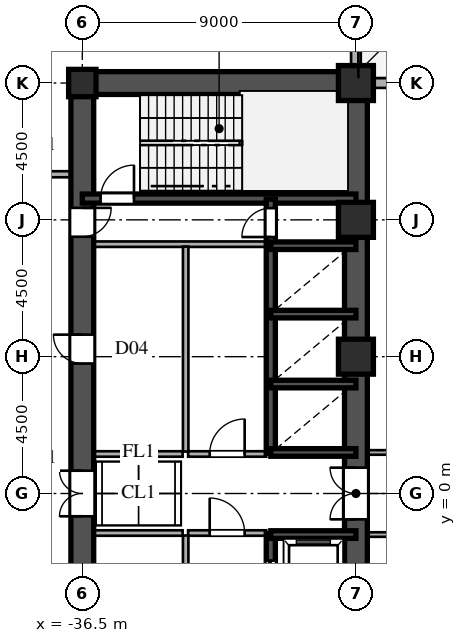
"""IFC4 building model, lengths in metres.
Left out: names, types, materials, properties, quantities, classifications, styles, units other than length and angle.
Written with IfcOpenShell. Run it as: python <this file> out.ifc"""

import sys

from ifc_helpers import new_model, si_unit, direction, frame, frame_2d, origin, origin_2d, place, context, subcontext, project, spatial, rectangle, hollow_rectangle, i_section, extrude, source, transform, mapped, element, fill, save


model = new_model("IFC4")
c1 = context("Model", 3, precision=1e-05, world=origin(), true_north=direction((0.0, 1.0)))
c2 = subcontext(c1, "Body", "Model", "MODEL_VIEW")
j1 = project(units=[si_unit("LENGTHUNIT", "METRE"), si_unit("PLANEANGLEUNIT", "RADIAN")], contexts=[c1])
p1 = place(None, origin())
s1 = spatial("IfcSite", under=j1, at=p1, CompositionType="ELEMENT")
p2 = place(p1, origin())
s2 = spatial("IfcBuilding", under=s1, at=p2, CompositionType="ELEMENT")
p3 = place(p2, frame((0.0, 0.0, 14.4)))
s3 = spatial("IfcBuildingStorey", under=s2, at=p3, CompositionType="ELEMENT", Elevation=14.4)
m1 = source(origin(), c2, "Body", "SweptSolid", [
    extrude(hollow_rectangle(XDim=1.15, YDim=1.15, WallThickness=0.048, at=origin_2d()), origin(), (0.0, 0.0, 1.0), 4.5),
])
for number, where, z_axis, x_axis in (
    (1, (-27.5, 4.5, 0.0), (0.0, 0.0, 1.0), (1.0, 0.0, 0.0)),
    (2, (-27.5, 9.0, 0.0), (0.0, 0.0, 1.0), (1.0, 0.0, 0.0)),
    (3, (-27.5, 13.5, 0.0), (0.0, 0.0, 1.0), (1.0, 0.0, 0.0)),
):
    element("IfcColumn", number, at=place(p3, frame(where, z_axis=z_axis, x_axis=x_axis)), inside=s3, PredefinedType="COLUMN", context=c2, shape_type="MappedRepresentation", body=[
        mapped(m1, transform((0.0, 0.0, 0.0), scale=1.0)),
    ])
m2 = source(origin(), c2, "Body", "SweptSolid", [
    extrude(i_section(OverallWidth=0.9, OverallDepth=0.9, WebThickness=0.036, FlangeThickness=0.055, at=origin_2d()), origin(), (0.0, 0.0, 1.0), 4.5),
])
p4 = place(p3, frame((-36.5, 13.5, 0.0), z_axis=(0.0, 0.0, 1.0), x_axis=(1.0, 0.0, 0.0)))
e4 = element("IfcColumn", 4, at=p4, inside=s3, PredefinedType="COLUMN", context=c2, shape_type="MappedRepresentation", body=[
    mapped(m2, transform((0.0, 0.0, 0.0), scale=1.0)),
])
p5 = place(p3, frame((27.46, 13.5, 0.0), z_axis=(0.0, 0.0, 1.0), x_axis=(-1.0, 0.0, 0.0)))
e5 = element("IfcWall", 5, at=p5, inside=s3, PredefinedType="SOLIDWALL", context=c2, shape_type="SweptSolid", body=[
    extrude(rectangle(XDim=54.92, YDim=0.32, at=frame_2d((27.46, 0.0))), origin(), (0.0, 0.0, 1.0), 4.28),
])
p6 = place(p5, frame((34.4, 0.0, 0.0)))
e6 = element("IfcOpeningElement", 6, at=p6, cuts=e5, PredefinedType="OPENING", context=c2, shape_type="SweptSolid", body=[
    extrude(rectangle(XDim=1.8, YDim=2.3, at=frame_2d((0.9, 1.15))), frame((0.0, 0.17, 0.0), z_axis=(0.0, -1.0, 0.0), x_axis=(1.0, 0.0, 0.0)), (0.0, 0.0, 1.0), 0.34),
])
p7 = place(p5, frame((37.4, 0.0, 0.0)))
e7 = element("IfcOpeningElement", 7, at=p7, cuts=e5, PredefinedType="OPENING", context=c2, shape_type="SweptSolid", body=[
    extrude(rectangle(XDim=1.8, YDim=2.3, at=frame_2d((0.9, 1.15))), frame((0.0, 0.17, 0.0), z_axis=(0.0, -1.0, 0.0), x_axis=(1.0, 0.0, 0.0)), (0.0, 0.0, 1.0), 0.34),
])
p8 = place(p5, frame((4.5, 0.0, 0.8)))
e8 = element("IfcOpeningElement", 8, at=p8, cuts=e5, PredefinedType="OPENING", context=c2, shape_type="SweptSolid", body=[
    extrude(rectangle(XDim=1.65, YDim=1.85, at=frame_2d((0.825, 0.925))), frame((0.0, 0.17, 0.0), z_axis=(0.0, -1.0, 0.0), x_axis=(1.0, 0.0, 0.0)), (0.0, 0.0, 1.0), 0.34),
])
p9 = place(p5, frame((25.0, 0.0, 0.8)))
e9 = element("IfcOpeningElement", 9, at=p9, cuts=e5, PredefinedType="OPENING", context=c2, shape_type="SweptSolid", body=[
    extrude(rectangle(XDim=1.65, YDim=1.85, at=frame_2d((0.825, 0.925))), frame((0.0, 0.17, 0.0), z_axis=(0.0, -1.0, 0.0), x_axis=(1.0, 0.0, 0.0)), (0.0, 0.0, 1.0), 0.34),
])
p10 = place(p5, frame((46.42, 0.0, 0.8)))
e10 = element("IfcOpeningElement", 10, at=p10, cuts=e5, PredefinedType="OPENING", context=c2, shape_type="SweptSolid", body=[
    extrude(rectangle(XDim=1.65, YDim=1.85, at=frame_2d((0.825, 0.925))), frame((0.0, 0.17, 0.0), z_axis=(0.0, -1.0, 0.0), x_axis=(1.0, 0.0, 0.0)), (0.0, 0.0, 1.0), 0.34),
])
p11 = place(p3, frame((-27.5, 13.55, 0.0), z_axis=(0.0, 0.0, 1.0), x_axis=(0.0, 1.0, 0.0)))
e11 = element("IfcWall", 11, at=p11, inside=s3, PredefinedType="SOLIDWALL", context=c2, shape_type="SweptSolid", body=[
    extrude(rectangle(XDim=10.4, YDim=0.32, at=frame_2d((5.2, 0.0))), origin(), (0.0, 0.0, 1.0), 2.78),
])
p12 = place(p3, frame((-30.537, 26.985, 0.0), z_axis=(0.0, 0.0, 1.0), x_axis=(-0.926944846568, -0.375197616492, 0.0)))
e12 = element("IfcWall", 12, at=p12, inside=s3, PredefinedType="SOLIDWALL", context=c2, shape_type="SweptSolid", body=[
    extrude(rectangle(XDim=45.23, YDim=0.32, at=frame_2d((22.615, 0.0))), origin(), (0.0, 0.0, 1.0), 4.28),
])
p13 = place(p12, frame((6.0, 0.0, 0.85)))
e13 = element("IfcOpeningElement", 13, at=p13, cuts=e12, PredefinedType="OPENING", context=c2, shape_type="SweptSolid", body=[
    extrude(rectangle(XDim=1.8, YDim=2.0, at=frame_2d((0.9, 1.0))), frame((0.0, 0.17, 0.0), z_axis=(0.0, -1.0, 0.0), x_axis=(1.0, 0.0, 0.0)), (0.0, 0.0, 1.0), 0.34),
])
p14 = place(p12, frame((36.23, 0.0, 0.85)))
e14 = element("IfcOpeningElement", 14, at=p14, cuts=e12, PredefinedType="OPENING", context=c2, shape_type="SweptSolid", body=[
    extrude(rectangle(XDim=1.8, YDim=2.0, at=frame_2d((0.9, 1.0))), frame((0.0, 0.17, 0.0), z_axis=(0.0, -1.0, 0.0), x_axis=(1.0, 0.0, 0.0)), (0.0, 0.0, 1.0), 0.34),
])
for number, where, z_axis, x_axis in (
    (15, (-27.5, -13.5, 0.0), (0.0, 0.0, 1.0), (0.0, 1.0, 0.0)),
    (16, (-27.5, 1.3, 0.0), (0.0, 0.0, 1.0), (0.0, 1.0, 0.0)),
):
    element("IfcWall", number, at=place(p3, frame(where, z_axis=z_axis, x_axis=x_axis)), inside=s3, PredefinedType="SHEAR", context=c2, shape_type="SweptSolid", body=[
        extrude(rectangle(XDim=12.2, YDim=0.75, at=frame_2d((6.1, 0.0))), origin(), (0.0, 0.0, 1.0), 4.28),
    ])
p15 = place(p3, frame((-27.5, -1.3, 0.0), z_axis=(0.0, 0.0, 1.0), x_axis=(0.0, 1.0, 0.0)))
e17 = element("IfcWall", 17, at=p15, inside=s3, PredefinedType="SHEAR", context=c2, shape_type="SweptSolid", body=[
    extrude(rectangle(XDim=2.6, YDim=0.75, at=frame_2d((1.3, 0.0))), origin(), (0.0, 0.0, 1.0), 4.28),
])
p16 = place(p15, frame((0.45, 0.0, 0.0)))
e18 = element("IfcOpeningElement", 18, at=p16, cuts=e17, PredefinedType="OPENING", context=c2, shape_type="SweptSolid", body=[
    extrude(rectangle(XDim=1.7, YDim=2.35, at=frame_2d((0.85, 1.175))), frame((0.0, 0.385, 0.0), z_axis=(0.0, -1.0, 0.0), x_axis=(1.0, 0.0, 0.0)), (0.0, 0.0, 1.0), 0.77),
])
p17 = place(p3, frame((-36.5, 13.5, 0.0), z_axis=(0.0, 0.0, 1.0), x_axis=(1.0, 0.0, 0.0)))
e19 = element("IfcWall", 19, at=p17, inside=s3, PredefinedType="SHEAR", context=c2, shape_type="SweptSolid", body=[
    extrude(rectangle(XDim=9.0, YDim=0.75, at=frame_2d((4.5, 0.0))), origin(), (0.0, 0.0, 1.0), 4.28),
])
p18 = place(p3, frame((-36.5, -1.3, 0.0), z_axis=(0.0, 0.0, 1.0), x_axis=(0.0, 1.0, 0.0)))
e20 = element("IfcWall", 20, at=p18, inside=s3, PredefinedType="SHEAR", context=c2, shape_type="SweptSolid", body=[
    extrude(rectangle(XDim=2.6, YDim=0.75, at=frame_2d((1.3, 0.0))), origin(), (0.0, 0.0, 1.0), 4.28),
])
p19 = place(p18, frame((0.55, 0.0, 0.0)))
e21 = element("IfcOpeningElement", 21, at=p19, cuts=e20, PredefinedType="OPENING", context=c2, shape_type="SweptSolid", body=[
    extrude(rectangle(XDim=1.5, YDim=2.3, at=frame_2d((0.75, 1.15))), frame((0.0, 0.385, 0.0), z_axis=(0.0, -1.0, 0.0), x_axis=(1.0, 0.0, 0.0)), (0.0, 0.0, 1.0), 0.77),
])
p20 = place(p3, frame((-36.5, 8.2, 0.0), z_axis=(0.0, 0.0, 1.0), x_axis=(0.0, 1.0, 0.0)))
e22 = element("IfcWall", 22, at=p20, inside=s3, PredefinedType="SHEAR", context=c2, shape_type="SweptSolid", body=[
    extrude(rectangle(XDim=5.45, YDim=0.75, at=frame_2d((2.725, 0.0))), origin(), (0.0, 0.0, 1.0), 4.28),
])
p21 = place(p20, frame((0.245, 0.0, 0.0)))
e23 = element("IfcOpeningElement", 23, at=p21, cuts=e22, PredefinedType="OPENING", context=c2, shape_type="SweptSolid", body=[
    extrude(rectangle(XDim=0.95, YDim=2.15, at=frame_2d((0.475, 1.075))), frame((0.0, 0.385, 0.0), z_axis=(0.0, -1.0, 0.0), x_axis=(1.0, 0.0, 0.0)), (0.0, 0.0, 1.0), 0.77),
])
p22 = place(p3, frame((-36.5, -6.5, 0.0), z_axis=(0.0, 0.0, 1.0), x_axis=(0.0, 1.0, 0.0)))
e24 = element("IfcWall", 24, at=p22, inside=s3, PredefinedType="SHEAR", context=c2, shape_type="SweptSolid", body=[
    extrude(rectangle(XDim=5.2, YDim=0.75, at=frame_2d((2.6, 0.0))), origin(), (0.0, 0.0, 1.0), 4.28),
])
p23 = place(p22, frame((2.125, 0.0, 0.0)))
e25 = element("IfcOpeningElement", 25, at=p23, cuts=e24, PredefinedType="OPENING", context=c2, shape_type="SweptSolid", body=[
    extrude(rectangle(XDim=0.95, YDim=2.15, at=frame_2d((0.475, 1.075))), frame((0.0, 0.385, 0.0), z_axis=(0.0, -1.0, 0.0), x_axis=(1.0, 0.0, 0.0)), (0.0, 0.0, 1.0), 0.77),
])
p24 = place(p3, frame((-36.5, 1.3, 0.0), z_axis=(0.0, 0.0, 1.0), x_axis=(0.0, 1.0, 0.0)))
e26 = element("IfcWall", 26, at=p24, inside=s3, PredefinedType="SHEAR", context=c2, shape_type="SweptSolid", body=[
    extrude(rectangle(XDim=6.9, YDim=0.75, at=frame_2d((3.45, 0.0))), origin(), (0.0, 0.0, 1.0), 4.28),
])
p25 = place(p24, frame((2.975, 0.0, 0.0)))
e27 = element("IfcOpeningElement", 27, at=p25, cuts=e26, PredefinedType="OPENING", context=c2, shape_type="SweptSolid", body=[
    extrude(rectangle(XDim=0.95, YDim=2.15, at=frame_2d((0.475, 1.075))), frame((0.0, 0.385, 0.0), z_axis=(0.0, -1.0, 0.0), x_axis=(1.0, 0.0, 0.0)), (0.0, 0.0, 1.0), 0.77),
])
p26 = place(p3, frame((-36.5, 9.7, 0.0), z_axis=(0.0, 0.0, 1.0), x_axis=(1.0, 0.0, 0.0)))
e28 = element("IfcWall", 28, at=p26, inside=s3, PredefinedType="SHEAR", context=c2, shape_type="SweptSolid", body=[
    extrude(rectangle(XDim=9.0, YDim=0.3, at=frame_2d((4.5, 0.0))), origin(), (0.0, 0.0, 1.0), 4.28),
])
p27 = place(p26, frame((0.6, 0.0, 0.0)))
e29 = element("IfcOpeningElement", 29, at=p27, cuts=e28, PredefinedType="OPENING", context=c2, shape_type="SweptSolid", body=[
    extrude(rectangle(XDim=1.1, YDim=2.2, at=frame_2d((0.55, 1.1))), frame((0.0, 0.16, 0.0), z_axis=(0.0, -1.0, 0.0), x_axis=(1.0, 0.0, 0.0)), (0.0, 0.0, 1.0), 0.32),
])
for number, where, z_axis, x_axis in (
    (30, (-30.3, -1.35, 0.0), (0.0, 0.0, 1.0), (1.0, 0.0, 0.0)),
    (31, (-30.3, 1.35, 0.0), (0.0, 0.0, 1.0), (1.0, 0.0, 0.0)),
    (32, (-30.3, 3.6, 0.0), (0.0, 0.0, 1.0), (1.0, 0.0, 0.0)),
    (33, (-30.3, 5.9, 0.0), (0.0, 0.0, 1.0), (1.0, 0.0, 0.0)),
    (34, (-30.3, 8.15, 0.0), (0.0, 0.0, 1.0), (1.0, 0.0, 0.0)),
):
    element("IfcWall", number, at=place(p3, frame(where, z_axis=z_axis, x_axis=x_axis)), inside=s3, PredefinedType="SHEAR", context=c2, shape_type="SweptSolid", body=[
        extrude(rectangle(XDim=2.8, YDim=0.25, at=frame_2d((1.4, 0.0))), origin(), (0.0, 0.0, 1.0), 4.28),
    ])
p28 = place(p3, frame((-30.3, -4.2, 0.0), z_axis=(0.0, 0.0, 1.0), x_axis=(0.0, 1.0, 0.0)))
e35 = element("IfcWall", 35, at=p28, inside=s3, PredefinedType="SHEAR", context=c2, shape_type="SweptSolid", body=[
    extrude(rectangle(XDim=2.88, YDim=0.3, at=frame_2d((1.44, 0.0))), origin(), (0.0, 0.0, 1.0), 4.28),
])
p29 = place(p28, frame((0.89, 0.0, 0.0)))
e36 = element("IfcOpeningElement", 36, at=p29, cuts=e35, PredefinedType="OPENING", context=c2, shape_type="SweptSolid", body=[
    extrude(rectangle(XDim=1.1, YDim=2.2, at=frame_2d((0.55, 1.1))), frame((0.0, 0.16, 0.0), z_axis=(0.0, -1.0, 0.0), x_axis=(1.0, 0.0, 0.0)), (0.0, 0.0, 1.0), 0.32),
])
p30 = place(p3, frame((-30.3, 1.32, 0.0), z_axis=(0.0, 0.0, 1.0), x_axis=(0.0, 1.0, 0.0)))
e37 = element("IfcWall", 37, at=p30, inside=s3, PredefinedType="SHEAR", context=c2, shape_type="SweptSolid", body=[
    extrude(rectangle(XDim=2.28, YDim=0.3, at=frame_2d((1.14, 0.0))), origin(), (0.0, 0.0, 1.0), 4.28),
])
p31 = place(p3, frame((-30.3, 3.6, 0.0), z_axis=(0.0, 0.0, 1.0), x_axis=(0.0, 1.0, 0.0)))
e38 = element("IfcWall", 38, at=p31, inside=s3, PredefinedType="SHEAR", context=c2, shape_type="SweptSolid", body=[
    extrude(rectangle(XDim=2.3, YDim=0.3, at=frame_2d((1.15, 0.0))), origin(), (0.0, 0.0, 1.0), 4.28),
])
p32 = place(p3, frame((-30.3, 5.9, 0.0), z_axis=(0.0, 0.0, 1.0), x_axis=(0.0, 1.0, 0.0)))
e39 = element("IfcWall", 39, at=p32, inside=s3, PredefinedType="SHEAR", context=c2, shape_type="SweptSolid", body=[
    extrude(rectangle(XDim=2.25, YDim=0.3, at=frame_2d((1.125, 0.0))), origin(), (0.0, 0.0, 1.0), 4.28),
])
p33 = place(p3, frame((-30.3, 8.15, 0.0), z_axis=(0.0, 0.0, 1.0), x_axis=(0.0, 1.0, 0.0)))
e40 = element("IfcWall", 40, at=p33, inside=s3, PredefinedType="SHEAR", context=c2, shape_type="SweptSolid", body=[
    extrude(rectangle(XDim=1.53, YDim=0.3, at=frame_2d((0.765, 0.0))), origin(), (0.0, 0.0, 1.0), 4.28),
])
p34 = place(p33, frame((0.285, 0.0, 0.0)))
e41 = element("IfcOpeningElement", 41, at=p34, cuts=e40, PredefinedType="OPENING", context=c2, shape_type="SweptSolid", body=[
    extrude(rectangle(XDim=0.95, YDim=2.15, at=frame_2d((0.475, 1.075))), frame((0.0, 0.16, 0.0), z_axis=(0.0, -1.0, 0.0), x_axis=(1.0, 0.0, 0.0)), (0.0, 0.0, 1.0), 0.32),
])
p35 = place(p3, frame((-36.15, 8.2, 0.0), z_axis=(0.0, 0.0, 1.0), x_axis=(1.0, 0.0, 0.0)))
e42 = element("IfcWall", 42, at=p35, inside=s3, PredefinedType="PARTITIONING", context=c2, shape_type="SweptSolid", body=[
    extrude(rectangle(XDim=5.7, YDim=0.18, at=frame_2d((2.85, 0.0))), origin(), (0.0, 0.0, 1.0), 4.28),
])
p36 = place(p3, frame((-33.1, -6.42, 0.0), z_axis=(0.0, 0.0, 1.0), x_axis=(0.0, 1.0, 0.0)))
e43 = element("IfcWall", 43, at=p36, inside=s3, PredefinedType="PARTITIONING", context=c2, shape_type="SweptSolid", body=[
    extrude(rectangle(XDim=5.04, YDim=0.18, at=frame_2d((2.52, 0.0))), origin(), (0.0, 0.0, 1.0), 4.28),
])
p37 = place(p3, frame((-33.1, 1.38, 0.0), z_axis=(0.0, 0.0, 1.0), x_axis=(0.0, 1.0, 0.0)))
e44 = element("IfcWall", 44, at=p37, inside=s3, PredefinedType="PARTITIONING", context=c2, shape_type="SweptSolid", body=[
    extrude(rectangle(XDim=6.74, YDim=0.18, at=frame_2d((3.37, 0.0))), origin(), (0.0, 0.0, 1.0), 4.28),
])
p38 = place(p3, frame((-33.02, -1.3, 0.0), z_axis=(0.0, 0.0, 1.0), x_axis=(1.0, 0.0, 0.0)))
e45 = element("IfcWall", 45, at=p38, inside=s3, PredefinedType="PARTITIONING", context=c2, shape_type="SweptSolid", body=[
    extrude(rectangle(XDim=2.57, YDim=0.18, at=frame_2d((1.285, 0.0))), origin(), (0.0, 0.0, 1.0), 4.28),
])
p39 = place(p38, frame((0.71, 0.0, 0.0)))
e46 = element("IfcOpeningElement", 46, at=p39, cuts=e45, PredefinedType="OPENING", context=c2, shape_type="SweptSolid", body=[
    extrude(rectangle(XDim=1.15, YDim=2.2, at=frame_2d((0.575, 1.1))), frame((0.0, 0.1, 0.0), z_axis=(0.0, -1.0, 0.0), x_axis=(1.0, 0.0, 0.0)), (0.0, 0.0, 1.0), 0.2),
])
p40 = place(p3, frame((-33.02, 1.3, 0.0), z_axis=(0.0, 0.0, 1.0), x_axis=(1.0, 0.0, 0.0)))
e47 = element("IfcWall", 47, at=p40, inside=s3, PredefinedType="PARTITIONING", context=c2, shape_type="SweptSolid", body=[
    extrude(rectangle(XDim=2.57, YDim=0.18, at=frame_2d((1.285, 0.0))), origin(), (0.0, 0.0, 1.0), 4.28),
])
p41 = place(p40, frame((0.71, 0.0, 0.0)))
e48 = element("IfcOpeningElement", 48, at=p41, cuts=e47, PredefinedType="OPENING", context=c2, shape_type="SweptSolid", body=[
    extrude(rectangle(XDim=1.15, YDim=2.2, at=frame_2d((0.575, 1.1))), frame((0.0, 0.1, 0.0), z_axis=(0.0, -1.0, 0.0), x_axis=(1.0, 0.0, 0.0)), (0.0, 0.0, 1.0), 0.2),
])
for number, where, z_axis, x_axis in (
    (49, (-36.15, -1.3, 0.0), (0.0, 0.0, 1.0), (1.0, 0.0, 0.0)),
    (50, (-36.15, 1.3, 0.0), (0.0, 0.0, 1.0), (1.0, 0.0, 0.0)),
):
    element("IfcWall", number, at=place(p3, frame(where, z_axis=z_axis, x_axis=x_axis)), inside=s3, PredefinedType="PARTITIONING", context=c2, shape_type="SweptSolid", body=[
        extrude(rectangle(XDim=2.95, YDim=0.18, at=frame_2d((1.475, 0.0))), origin(), (0.0, 0.0, 1.0), 4.28),
    ])
for number, where, z_axis, x_axis in (
    (51, (-27.12, -1.35, 0.0), (0.0, 0.0, 1.0), (1.0, 0.0, 0.0)),
    (52, (-27.12, 1.35, 0.0), (0.0, 0.0, 1.0), (1.0, 0.0, 0.0)),
):
    element("IfcWall", number, at=place(p3, frame(where, z_axis=z_axis, x_axis=x_axis)), inside=s3, PredefinedType="PARTITIONING", context=c2, shape_type="SweptSolid", body=[
        extrude(rectangle(XDim=14.835, YDim=0.15, at=frame_2d((7.417, 0.0))), origin(), (0.0, 0.0, 1.0), 4.28),
    ])
p42 = place(p3, frame((-38.915, 10.5, 0.0), z_axis=(0.0, 0.0, 1.0), x_axis=(1.0, 0.0, 0.0)))
e53 = element("IfcWall", 53, at=p42, inside=s3, PredefinedType="PARTITIONING", context=c2, shape_type="SweptSolid", body=[
    extrude(rectangle(XDim=2.035, YDim=0.2, at=frame_2d((1.018, 0.0))), origin(), (0.0, 0.0, 1.0), 4.28),
])
m3 = source(origin(), c2, "Body", "SweptSolid", [
    extrude(rectangle(XDim=1.7, YDim=2.35, at=frame_2d((0.85, 1.175))), frame((0.0, 0.025, 0.0), z_axis=(0.0, -1.0, 0.0), x_axis=(1.0, 0.0, 0.0)), (0.0, 0.0, 1.0), 0.05),
])
p43 = place(p16, origin())
e54 = element("IfcDoor", 54, at=p43, inside=s3, OperationType="DOUBLE_SWING_LEFT", PredefinedType="DOOR", context=c2, shape_type="MappedRepresentation", body=[
    mapped(m3, transform((0.0, 0.0, 0.0), scale=1.0)),
])
fill(e18, e54)
m4 = source(origin(), c2, "Body", "SweptSolid", [
    extrude(rectangle(XDim=1.5, YDim=2.3, at=frame_2d((0.75, 1.15))), frame((0.0, 0.025, 0.0), z_axis=(0.0, -1.0, 0.0), x_axis=(1.0, 0.0, 0.0)), (0.0, 0.0, 1.0), 0.05),
])
p44 = place(p19, origin())
e55 = element("IfcDoor", 55, at=p44, inside=s3, OperationType="DOUBLE_SWING_LEFT", PredefinedType="DOOR", context=c2, shape_type="MappedRepresentation", body=[
    mapped(m4, transform((0.0, 0.0, 0.0), scale=1.0)),
])
fill(e21, e55)
m5 = source(origin(), c2, "Body", "SweptSolid", [
    extrude(rectangle(XDim=0.95, YDim=2.15, at=frame_2d((0.475, 1.075))), frame((0.0, 0.025, 0.0), z_axis=(0.0, -1.0, 0.0), x_axis=(1.0, 0.0, 0.0)), (0.0, 0.0, 1.0), 0.05),
])
p45 = place(p21, frame((0.95, 0.0, 0.0), z_axis=(0.0, 0.0, 1.0), x_axis=(-1.0, 0.0, 0.0)))
e56 = element("IfcDoor", 56, at=p45, inside=s3, OperationType="SINGLE_SWING_RIGHT", PredefinedType="DOOR", context=c2, shape_type="MappedRepresentation", body=[
    mapped(m5, transform((0.0, 0.0, 0.0), scale=1.0)),
])
fill(e23, e56)
p46 = place(p25, origin())
e57 = element("IfcDoor", 57, at=p46, inside=s3, OperationType="SINGLE_SWING_RIGHT", PredefinedType="DOOR", context=c2, shape_type="MappedRepresentation", body=[
    mapped(m5, transform((0.0, 0.0, 0.0), scale=1.0)),
])
fill(e27, e57)
m6 = source(origin(), c2, "Body", "SweptSolid", [
    extrude(rectangle(XDim=1.1, YDim=2.2, at=frame_2d((0.55, 1.1))), frame((0.0, 0.025, 0.0), z_axis=(0.0, -1.0, 0.0), x_axis=(1.0, 0.0, 0.0)), (0.0, 0.0, 1.0), 0.05),
])
p47 = place(p27, origin())
e58 = element("IfcDoor", 58, at=p47, inside=s3, OperationType="SINGLE_SWING_RIGHT", PredefinedType="DOOR", context=c2, shape_type="MappedRepresentation", body=[
    mapped(m6, transform((0.0, 0.0, 0.0), scale=1.0)),
])
fill(e29, e58)
m7 = source(origin(), c2, "Body", "SweptSolid", [
    extrude(rectangle(XDim=1.1, YDim=2.2, at=frame_2d((0.55, 1.1))), frame((0.0, 0.025, 0.0), z_axis=(0.0, -1.0, 0.0), x_axis=(1.0, 0.0, 0.0)), (0.0, 0.0, 1.0), 0.05),
])
p48 = place(p29, origin())
e59 = element("IfcDoor", 59, at=p48, inside=s3, OperationType="DOUBLE_DOOR_SLIDING", PredefinedType="DOOR", context=c2, shape_type="MappedRepresentation", body=[
    mapped(m7, transform((0.0, 0.0, 0.0), scale=1.0)),
])
fill(e36, e59)
p49 = place(p34, origin())
e60 = element("IfcDoor", 60, at=p49, inside=s3, OperationType="SINGLE_SWING_LEFT", PredefinedType="DOOR", context=c2, shape_type="MappedRepresentation", body=[
    mapped(m5, transform((0.0, 0.0, 0.0), scale=1.0)),
])
fill(e41, e60)
m8 = source(origin(), c2, "Body", "SweptSolid", [
    extrude(rectangle(XDim=1.15, YDim=2.2, at=frame_2d((0.575, 1.1))), frame((0.0, 0.025, 0.0), z_axis=(0.0, -1.0, 0.0), x_axis=(1.0, 0.0, 0.0)), (0.0, 0.0, 1.0), 0.05),
])
p50 = place(p39, origin())
e61 = element("IfcDoor", 61, at=p50, inside=s3, OperationType="SINGLE_SWING_LEFT", PredefinedType="DOOR", context=c2, shape_type="MappedRepresentation", body=[
    mapped(m8, transform((0.0, 0.0, 0.0), scale=1.0)),
])
fill(e46, e61)
p51 = place(p41, origin())
e62 = element("IfcDoor", 62, at=p51, inside=s3, OperationType="SINGLE_SWING_RIGHT", PredefinedType="DOOR", context=c2, shape_type="MappedRepresentation", body=[
    mapped(m8, transform((0.0, 0.0, 0.0), scale=1.0)),
])
fill(e48, e62)
save(model, sys.argv[1])
